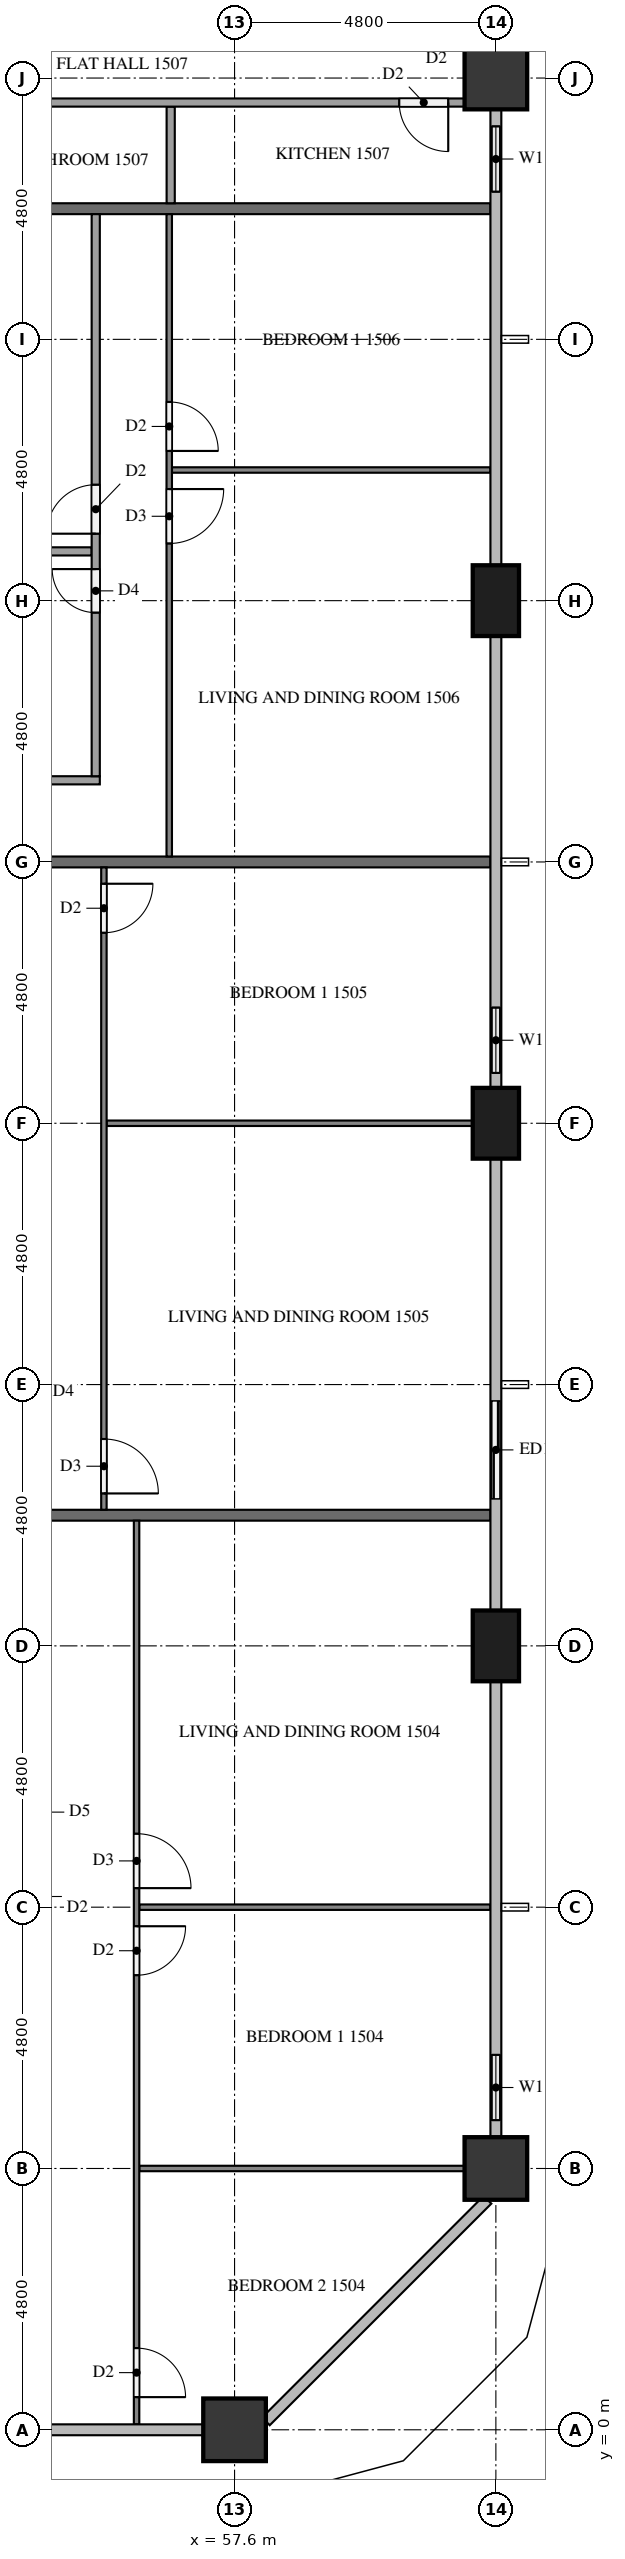
"""IFC4 building model, lengths in metres.
Left out: names, types, materials, properties, quantities, classifications, styles, units other than length and angle.
Written with IfcOpenShell. Run it as: python <this file> out.ifc"""

import sys

from ifc_helpers import new_model, si_unit, direction, frame, frame_2d, origin, origin_2d, place, context, subcontext, project, spatial, rectangle, extrude, element, fill, save


model = new_model("IFC4")
c1 = context("Model", 3, precision=1e-05, world=origin(), true_north=direction((0.0, 1.0)))
c2 = subcontext(c1, "Body", "Model", "MODEL_VIEW")
j1 = project(units=[si_unit("LENGTHUNIT", "METRE"), si_unit("PLANEANGLEUNIT", "RADIAN")], contexts=[c1])
p1 = place(None, origin())
s1 = spatial("IfcSite", under=j1, at=p1, CompositionType="ELEMENT")
p2 = place(p1, origin())
s2 = spatial("IfcBuilding", under=s1, at=p2, CompositionType="ELEMENT")
p3 = place(p2, frame((0.0, 0.0, 62.8)))
s3 = spatial("IfcBuildingStorey", under=s2, at=p3, CompositionType="ELEMENT", Elevation=62.8)
for number, where, z_axis, x_axis in (
    (1, (57.6, 0.0, 0.0), (0.0, 0.0, 1.0), (1.0, 0.0, 0.0)),
    (2, (62.4, 4.8, 0.0), (0.0, 0.0, 1.0), (1.0, 0.0, 0.0)),
):
    element("IfcColumn", number, at=place(p3, frame(where, z_axis=z_axis, x_axis=x_axis)), inside=s3, PredefinedType="COLUMN", context=c2, shape_type="SweptSolid", body=[
        extrude(rectangle(XDim=1.15, YDim=1.15, at=origin_2d()), origin(), (0.0, 0.0, 1.0), 3.2),
    ])
for number, where, z_axis, x_axis in (
    (3, (62.4, 14.4, 0.0), (0.0, 0.0, 1.0), (0.0, 1.0, 0.0)),
    (4, (62.4, 24.0, 0.0), (0.0, 0.0, 1.0), (0.0, 1.0, 0.0)),
    (5, (62.4, 33.6, 0.0), (0.0, 0.0, 1.0), (0.0, 1.0, 0.0)),
):
    element("IfcColumn", number, at=place(p3, frame(where, z_axis=z_axis, x_axis=x_axis)), inside=s3, PredefinedType="COLUMN", context=c2, shape_type="SweptSolid", body=[
        extrude(rectangle(XDim=1.3, YDim=0.85, at=origin_2d()), origin(), (0.0, 0.0, 1.0), 3.2),
    ])
p4 = place(p3, frame((62.4, 43.2, 0.0), z_axis=(0.0, 0.0, 1.0), x_axis=(1.0, 0.0, 0.0)))
e6 = element("IfcColumn", 6, at=p4, inside=s3, PredefinedType="COLUMN", context=c2, shape_type="SweptSolid", body=[
    extrude(rectangle(XDim=1.15, YDim=1.15, at=origin_2d()), origin(), (0.0, 0.0, 1.0), 3.2),
])
p5 = place(p3, frame((62.4, 5.375, 0.0), z_axis=(0.0, 0.0, 1.0), x_axis=(0.0, 1.0, 0.0)))
e7 = element("IfcWall", 7, at=p5, inside=s3, PredefinedType="SOLIDWALL", context=c2, shape_type="SweptSolid", body=[
    extrude(rectangle(XDim=1.825, YDim=0.15, at=frame_2d((0.913, 0.0))), origin(), (0.0, 0.0, 1.0), 3.2),
])
p6 = place(p5, frame((0.312, 0.0, 0.9)))
e8 = element("IfcOpeningElement", 8, at=p6, cuts=e7, PredefinedType="OPENING", context=c2, shape_type="SweptSolid", body=[
    extrude(rectangle(XDim=1.2, YDim=1.4, at=frame_2d((0.6, 0.7))), frame((0.0, 0.085, 0.0), z_axis=(0.0, -1.0, 0.0), x_axis=(1.0, 0.0, 0.0)), (0.0, 0.0, 1.0), 0.17),
])
p7 = place(p3, frame((62.4, 16.8, 0.0), z_axis=(0.0, 0.0, 1.0), x_axis=(0.0, 1.0, 0.0)))
e9 = element("IfcWall", 9, at=p7, inside=s3, PredefinedType="SOLIDWALL", context=c2, shape_type="SweptSolid", body=[
    extrude(rectangle(XDim=2.4, YDim=0.15, at=frame_2d((1.2, 0.0))), origin(), (0.0, 0.0, 1.0), 3.2),
])
p8 = place(p7, frame((0.3, 0.0, 0.0)))
e10 = element("IfcOpeningElement", 10, at=p8, cuts=e9, PredefinedType="OPENING", context=c2, shape_type="SweptSolid", body=[
    extrude(rectangle(XDim=1.8, YDim=2.4, at=frame_2d((0.9, 1.2))), frame((0.0, 0.085, 0.0), z_axis=(0.0, -1.0, 0.0), x_axis=(1.0, 0.0, 0.0)), (0.0, 0.0, 1.0), 0.17),
])
p9 = place(p3, frame((62.4, 24.65, 0.0), z_axis=(0.0, 0.0, 1.0), x_axis=(0.0, 1.0, 0.0)))
e11 = element("IfcWall", 11, at=p9, inside=s3, PredefinedType="SOLIDWALL", context=c2, shape_type="SweptSolid", body=[
    extrude(rectangle(XDim=1.75, YDim=0.15, at=frame_2d((0.875, 0.0))), origin(), (0.0, 0.0, 1.0), 3.2),
])
p10 = place(p9, frame((0.275, 0.0, 0.9)))
e12 = element("IfcOpeningElement", 12, at=p10, cuts=e11, PredefinedType="OPENING", context=c2, shape_type="SweptSolid", body=[
    extrude(rectangle(XDim=1.2, YDim=1.4, at=frame_2d((0.6, 0.7))), frame((0.0, 0.085, 0.0), z_axis=(0.0, -1.0, 0.0), x_axis=(1.0, 0.0, 0.0)), (0.0, 0.0, 1.0), 0.17),
])
p11 = place(p3, frame((62.4, 40.8, 0.0), z_axis=(0.0, 0.0, 1.0), x_axis=(0.0, 1.0, 0.0)))
e13 = element("IfcWall", 13, at=p11, inside=s3, PredefinedType="SOLIDWALL", context=c2, shape_type="SweptSolid", body=[
    extrude(rectangle(XDim=1.825, YDim=0.15, at=frame_2d((0.913, 0.0))), origin(), (0.0, 0.0, 1.0), 3.2),
])
p12 = place(p11, frame((0.312, 0.0, 0.9)))
e14 = element("IfcOpeningElement", 14, at=p12, cuts=e13, PredefinedType="OPENING", context=c2, shape_type="SweptSolid", body=[
    extrude(rectangle(XDim=1.2, YDim=1.4, at=frame_2d((0.6, 0.7))), frame((0.0, 0.085, 0.0), z_axis=(0.0, -1.0, 0.0), x_axis=(1.0, 0.0, 0.0)), (0.0, 0.0, 1.0), 0.17),
])
for number, where, z_axis, x_axis in (
    (15, (50.5, 16.8, 0.0), (0.0, 0.0, 1.0), (1.0, 0.0, 0.0)),
    (16, (50.5, 28.8, 0.0), (0.0, 0.0, 1.0), (1.0, 0.0, 0.0)),
    (17, (50.5, 40.8, 0.0), (0.0, 0.0, 1.0), (1.0, 0.0, 0.0)),
):
    element("IfcWall", number, at=place(p3, frame(where, z_axis=z_axis, x_axis=x_axis)), inside=s3, PredefinedType="PARTITIONING", context=c2, shape_type="SweptSolid", body=[
        extrude(rectangle(XDim=11.8, YDim=0.2, at=frame_2d((5.9, 0.0))), origin(), (0.0, 0.0, 1.0), 3.2),
    ])
p13 = place(p3, frame((55.85, 9.6, 0.0), z_axis=(0.0, 0.0, 1.0), x_axis=(1.0, 0.0, 0.0)))
e18 = element("IfcWall", 18, at=p13, inside=s3, PredefinedType="PARTITIONING", context=c2, shape_type="SweptSolid", body=[
    extrude(rectangle(XDim=6.45, YDim=0.1, at=frame_2d((3.225, 0.0))), origin(), (0.0, 0.0, 1.0), 3.2),
])
p14 = place(p3, frame((55.85, 4.8, 0.0), z_axis=(0.0, 0.0, 1.0), x_axis=(1.0, 0.0, 0.0)))
e19 = element("IfcWall", 19, at=p14, inside=s3, PredefinedType="PARTITIONING", context=c2, shape_type="SweptSolid", body=[
    extrude(rectangle(XDim=5.975, YDim=0.1, at=frame_2d((2.987, 0.0))), origin(), (0.0, 0.0, 1.0), 3.2),
])
p15 = place(p3, frame((55.8, 16.7, 0.0), z_axis=(0.0, 0.0, 1.0), x_axis=(0.0, -1.0, 0.0)))
e20 = element("IfcWall", 20, at=p15, inside=s3, PredefinedType="PARTITIONING", context=c2, shape_type="SweptSolid", body=[
    extrude(rectangle(XDim=16.6, YDim=0.1, at=frame_2d((8.3, 0.0))), origin(), (0.0, 0.0, 1.0), 3.2),
])
p16 = place(p15, frame((5.75, 0.0, 0.0)))
e21 = element("IfcOpeningElement", 21, at=p16, cuts=e20, PredefinedType="OPENING", context=c2, shape_type="SweptSolid", body=[
    extrude(rectangle(XDim=1.0, YDim=2.1, at=frame_2d((0.5, 1.05))), frame((0.0, 0.06, 0.0), z_axis=(0.0, -1.0, 0.0), x_axis=(1.0, 0.0, 0.0)), (0.0, 0.0, 1.0), 0.12),
])
p17 = place(p15, frame((7.45, 0.0, 0.0)))
e22 = element("IfcOpeningElement", 22, at=p17, cuts=e20, PredefinedType="OPENING", context=c2, shape_type="SweptSolid", body=[
    extrude(rectangle(XDim=0.9, YDim=2.1, at=frame_2d((0.45, 1.05))), frame((0.0, 0.06, 0.0), z_axis=(0.0, -1.0, 0.0), x_axis=(1.0, 0.0, 0.0)), (0.0, 0.0, 1.0), 0.12),
])
p18 = place(p15, frame((15.2, 0.0, 0.0)))
e23 = element("IfcOpeningElement", 23, at=p18, cuts=e20, PredefinedType="OPENING", context=c2, shape_type="SweptSolid", body=[
    extrude(rectangle(XDim=0.9, YDim=2.1, at=frame_2d((0.45, 1.05))), frame((0.0, 0.06, 0.0), z_axis=(0.0, -1.0, 0.0), x_axis=(1.0, 0.0, 0.0)), (0.0, 0.0, 1.0), 0.12),
])
p19 = place(p3, frame((55.25, 24.0, 0.0), z_axis=(0.0, 0.0, 1.0), x_axis=(1.0, 0.0, 0.0)))
e24 = element("IfcWall", 24, at=p19, inside=s3, PredefinedType="PARTITIONING", context=c2, shape_type="SweptSolid", body=[
    extrude(rectangle(XDim=6.725, YDim=0.1, at=frame_2d((3.363, 0.0))), origin(), (0.0, 0.0, 1.0), 3.2),
])
p20 = place(p3, frame((55.2, 28.7, 0.0), z_axis=(0.0, 0.0, 1.0), x_axis=(0.0, -1.0, 0.0)))
e25 = element("IfcWall", 25, at=p20, inside=s3, PredefinedType="PARTITIONING", context=c2, shape_type="SweptSolid", body=[
    extrude(rectangle(XDim=11.8, YDim=0.1, at=frame_2d((5.9, 0.0))), origin(), (0.0, 0.0, 1.0), 3.2),
])
p21 = place(p20, frame((10.5, 0.0, 0.0)))
e26 = element("IfcOpeningElement", 26, at=p21, cuts=e25, PredefinedType="OPENING", context=c2, shape_type="SweptSolid", body=[
    extrude(rectangle(XDim=1.0, YDim=2.1, at=frame_2d((0.5, 1.05))), frame((0.0, 0.06, 0.0), z_axis=(0.0, -1.0, 0.0), x_axis=(1.0, 0.0, 0.0)), (0.0, 0.0, 1.0), 0.12),
])
p22 = place(p20, frame((0.3, 0.0, 0.0)))
e27 = element("IfcOpeningElement", 27, at=p22, cuts=e25, PredefinedType="OPENING", context=c2, shape_type="SweptSolid", body=[
    extrude(rectangle(XDim=0.9, YDim=2.1, at=frame_2d((0.45, 1.05))), frame((0.0, 0.06, 0.0), z_axis=(0.0, -1.0, 0.0), x_axis=(1.0, 0.0, 0.0)), (0.0, 0.0, 1.0), 0.12),
])
p23 = place(p3, frame((56.45, 36.0, 0.0), z_axis=(0.0, 0.0, 1.0), x_axis=(1.0, 0.0, 0.0)))
e28 = element("IfcWall", 28, at=p23, inside=s3, PredefinedType="PARTITIONING", context=c2, shape_type="SweptSolid", body=[
    extrude(rectangle(XDim=5.85, YDim=0.1, at=frame_2d((2.925, 0.0))), origin(), (0.0, 0.0, 1.0), 3.2),
])
p24 = place(p3, frame((56.4, 40.7, 0.0), z_axis=(0.0, 0.0, 1.0), x_axis=(0.0, -1.0, 0.0)))
e29 = element("IfcWall", 29, at=p24, inside=s3, PredefinedType="PARTITIONING", context=c2, shape_type="SweptSolid", body=[
    extrude(rectangle(XDim=11.8, YDim=0.1, at=frame_2d((5.9, 0.0))), origin(), (0.0, 0.0, 1.0), 3.2),
])
p25 = place(p24, frame((5.05, 0.0, 0.0)))
e30 = element("IfcOpeningElement", 30, at=p25, cuts=e29, PredefinedType="OPENING", context=c2, shape_type="SweptSolid", body=[
    extrude(rectangle(XDim=1.0, YDim=2.1, at=frame_2d((0.5, 1.05))), frame((0.0, 0.06, 0.0), z_axis=(0.0, -1.0, 0.0), x_axis=(1.0, 0.0, 0.0)), (0.0, 0.0, 1.0), 0.12),
])
p26 = place(p24, frame((3.45, 0.0, 0.0)))
e31 = element("IfcOpeningElement", 31, at=p26, cuts=e29, PredefinedType="OPENING", context=c2, shape_type="SweptSolid", body=[
    extrude(rectangle(XDim=0.9, YDim=2.1, at=frame_2d((0.45, 1.05))), frame((0.0, 0.06, 0.0), z_axis=(0.0, -1.0, 0.0), x_axis=(1.0, 0.0, 0.0)), (0.0, 0.0, 1.0), 0.12),
])
p27 = place(p3, frame((50.5, 34.505, 0.0), z_axis=(0.0, 0.0, 1.0), x_axis=(1.0, 0.0, 0.0)))
e32 = element("IfcWall", 32, at=p27, inside=s3, PredefinedType="PARTITIONING", context=c2, shape_type="SweptSolid", body=[
    extrude(rectangle(XDim=4.475, YDim=0.15, at=frame_2d((2.238, 0.0))), origin(), (0.0, 0.0, 1.0), 3.2),
])
p28 = place(p3, frame((50.5, 30.3, 0.0), z_axis=(0.0, 0.0, 1.0), x_axis=(1.0, 0.0, 0.0)))
e33 = element("IfcWall", 33, at=p28, inside=s3, PredefinedType="PARTITIONING", context=c2, shape_type="SweptSolid", body=[
    extrude(rectangle(XDim=4.625, YDim=0.15, at=frame_2d((2.312, 0.0))), origin(), (0.0, 0.0, 1.0), 3.2),
])
p29 = place(p3, frame((55.05, 30.375, 0.0), z_axis=(0.0, 0.0, 1.0), x_axis=(0.0, 1.0, 0.0)))
e34 = element("IfcWall", 34, at=p29, inside=s3, PredefinedType="PARTITIONING", context=c2, shape_type="SweptSolid", body=[
    extrude(rectangle(XDim=10.325, YDim=0.15, at=frame_2d((5.163, 0.0))), origin(), (0.0, 0.0, 1.0), 3.2),
])
p30 = place(p29, frame((3.005, 0.0, 0.0)))
e35 = element("IfcOpeningElement", 35, at=p30, cuts=e34, PredefinedType="OPENING", context=c2, shape_type="SweptSolid", body=[
    extrude(rectangle(XDim=0.8, YDim=2.1, at=frame_2d((0.4, 1.05))), frame((0.0, 0.085, 0.0), z_axis=(0.0, -1.0, 0.0), x_axis=(1.0, 0.0, 0.0)), (0.0, 0.0, 1.0), 0.17),
])
p31 = place(p29, frame((4.455, 0.0, 0.0)))
e36 = element("IfcOpeningElement", 36, at=p31, cuts=e34, PredefinedType="OPENING", context=c2, shape_type="SweptSolid", body=[
    extrude(rectangle(XDim=0.9, YDim=2.1, at=frame_2d((0.45, 1.05))), frame((0.0, 0.085, 0.0), z_axis=(0.0, -1.0, 0.0), x_axis=(1.0, 0.0, 0.0)), (0.0, 0.0, 1.0), 0.17),
])
p32 = place(p3, frame((56.427, 40.9, 0.0), z_axis=(0.0, 0.0, 1.0), x_axis=(0.0, 1.0, 0.0)))
e37 = element("IfcWall", 37, at=p32, inside=s3, PredefinedType="PARTITIONING", context=c2, shape_type="SweptSolid", body=[
    extrude(rectangle(XDim=1.775, YDim=0.15, at=frame_2d((0.888, 0.0))), origin(), (0.0, 0.0, 1.0), 3.2),
])
p33 = place(p3, frame((61.825, 42.75, 0.0), z_axis=(0.0, 0.0, 1.0), x_axis=(-1.0, 0.0, 0.0)))
e38 = element("IfcWall", 38, at=p33, inside=s3, PredefinedType="PARTITIONING", context=c2, shape_type="SweptSolid", body=[
    extrude(rectangle(XDim=12.25, YDim=0.15, at=frame_2d((6.125, 0.0))), origin(), (0.0, 0.0, 1.0), 3.2),
])
p34 = place(p33, frame((9.638, 0.0, 0.0)))
e39 = element("IfcOpeningElement", 39, at=p34, cuts=e38, PredefinedType="OPENING", context=c2, shape_type="SweptSolid", body=[
    extrude(rectangle(XDim=0.8, YDim=2.1, at=frame_2d((0.4, 1.05))), frame((0.0, 0.085, 0.0), z_axis=(0.0, -1.0, 0.0), x_axis=(1.0, 0.0, 0.0)), (0.0, 0.0, 1.0), 0.17),
])
p35 = place(p33, frame((8.088, 0.0, 0.0)))
e40 = element("IfcOpeningElement", 40, at=p35, cuts=e38, PredefinedType="OPENING", context=c2, shape_type="SweptSolid", body=[
    extrude(rectangle(XDim=0.9, YDim=2.1, at=frame_2d((0.45, 1.05))), frame((0.0, 0.085, 0.0), z_axis=(0.0, -1.0, 0.0), x_axis=(1.0, 0.0, 0.0)), (0.0, 0.0, 1.0), 0.17),
])
p36 = place(p33, frame((0.3, 0.0, 0.0)))
e41 = element("IfcOpeningElement", 41, at=p36, cuts=e38, PredefinedType="OPENING", context=c2, shape_type="SweptSolid", body=[
    extrude(rectangle(XDim=0.9, YDim=2.1, at=frame_2d((0.45, 1.05))), frame((0.0, 0.085, 0.0), z_axis=(0.0, -1.0, 0.0), x_axis=(1.0, 0.0, 0.0)), (0.0, 0.0, 1.0), 0.17),
])
p37 = place(p6, origin())
e42 = element("IfcWindow", 42, at=p37, inside=s3, PartitioningType="SINGLE_PANEL", PredefinedType="WINDOW", context=c2, shape_type="SweptSolid", body=[
    extrude(rectangle(XDim=1.2, YDim=1.4, at=frame_2d((0.6, 0.7))), frame((0.0, 0.03, 0.0), z_axis=(0.0, -1.0, 0.0), x_axis=(1.0, 0.0, 0.0)), (0.0, 0.0, 1.0), 0.06),
])
fill(e8, e42)
p38 = place(p8, origin())
e43 = element("IfcDoor", 43, at=p38, inside=s3, OperationType="SLIDING_TO_LEFT", PredefinedType="DOOR", context=c2, shape_type="SweptSolid", body=[
    extrude(rectangle(XDim=1.8, YDim=2.4, at=frame_2d((0.9, 1.2))), frame((0.0, 0.025, 0.0), z_axis=(0.0, -1.0, 0.0), x_axis=(1.0, 0.0, 0.0)), (0.0, 0.0, 1.0), 0.05),
])
fill(e10, e43)
p39 = place(p10, origin())
e44 = element("IfcWindow", 44, at=p39, inside=s3, PartitioningType="SINGLE_PANEL", PredefinedType="WINDOW", context=c2, shape_type="SweptSolid", body=[
    extrude(rectangle(XDim=1.2, YDim=1.4, at=frame_2d((0.6, 0.7))), frame((0.0, 0.03, 0.0), z_axis=(0.0, -1.0, 0.0), x_axis=(1.0, 0.0, 0.0)), (0.0, 0.0, 1.0), 0.06),
])
fill(e12, e44)
p40 = place(p12, origin())
e45 = element("IfcWindow", 45, at=p40, inside=s3, PartitioningType="SINGLE_PANEL", PredefinedType="WINDOW", context=c2, shape_type="SweptSolid", body=[
    extrude(rectangle(XDim=1.2, YDim=1.4, at=frame_2d((0.6, 0.7))), frame((0.0, 0.03, 0.0), z_axis=(0.0, -1.0, 0.0), x_axis=(1.0, 0.0, 0.0)), (0.0, 0.0, 1.0), 0.06),
])
fill(e14, e45)
p41 = place(p16, origin())
e46 = element("IfcDoor", 46, at=p41, inside=s3, OperationType="SINGLE_SWING_RIGHT", PredefinedType="DOOR", context=c2, shape_type="SweptSolid", body=[
    extrude(rectangle(XDim=1.0, YDim=2.1, at=frame_2d((0.5, 1.05))), frame((0.0, 0.025, 0.0), z_axis=(0.0, -1.0, 0.0), x_axis=(1.0, 0.0, 0.0)), (0.0, 0.0, 1.0), 0.05),
])
fill(e21, e46)
p42 = place(p17, origin())
e47 = element("IfcDoor", 47, at=p42, inside=s3, OperationType="SINGLE_SWING_LEFT", PredefinedType="DOOR", context=c2, shape_type="SweptSolid", body=[
    extrude(rectangle(XDim=0.9, YDim=2.1, at=frame_2d((0.45, 1.05))), frame((0.0, 0.025, 0.0), z_axis=(0.0, -1.0, 0.0), x_axis=(1.0, 0.0, 0.0)), (0.0, 0.0, 1.0), 0.05),
])
fill(e22, e47)
p43 = place(p18, origin())
e48 = element("IfcDoor", 48, at=p43, inside=s3, OperationType="SINGLE_SWING_RIGHT", PredefinedType="DOOR", context=c2, shape_type="SweptSolid", body=[
    extrude(rectangle(XDim=0.9, YDim=2.1, at=frame_2d((0.45, 1.05))), frame((0.0, 0.025, 0.0), z_axis=(0.0, -1.0, 0.0), x_axis=(1.0, 0.0, 0.0)), (0.0, 0.0, 1.0), 0.05),
])
fill(e23, e48)
p44 = place(p21, origin())
e49 = element("IfcDoor", 49, at=p44, inside=s3, OperationType="SINGLE_SWING_RIGHT", PredefinedType="DOOR", context=c2, shape_type="SweptSolid", body=[
    extrude(rectangle(XDim=1.0, YDim=2.1, at=frame_2d((0.5, 1.05))), frame((0.0, 0.025, 0.0), z_axis=(0.0, -1.0, 0.0), x_axis=(1.0, 0.0, 0.0)), (0.0, 0.0, 1.0), 0.05),
])
fill(e26, e49)
p45 = place(p22, origin())
e50 = element("IfcDoor", 50, at=p45, inside=s3, OperationType="SINGLE_SWING_LEFT", PredefinedType="DOOR", context=c2, shape_type="SweptSolid", body=[
    extrude(rectangle(XDim=0.9, YDim=2.1, at=frame_2d((0.45, 1.05))), frame((0.0, 0.025, 0.0), z_axis=(0.0, -1.0, 0.0), x_axis=(1.0, 0.0, 0.0)), (0.0, 0.0, 1.0), 0.05),
])
fill(e27, e50)
p46 = place(p25, origin())
e51 = element("IfcDoor", 51, at=p46, inside=s3, OperationType="SINGLE_SWING_LEFT", PredefinedType="DOOR", context=c2, shape_type="SweptSolid", body=[
    extrude(rectangle(XDim=1.0, YDim=2.1, at=frame_2d((0.5, 1.05))), frame((0.0, 0.025, 0.0), z_axis=(0.0, -1.0, 0.0), x_axis=(1.0, 0.0, 0.0)), (0.0, 0.0, 1.0), 0.05),
])
fill(e30, e51)
p47 = place(p26, origin())
e52 = element("IfcDoor", 52, at=p47, inside=s3, OperationType="SINGLE_SWING_RIGHT", PredefinedType="DOOR", context=c2, shape_type="SweptSolid", body=[
    extrude(rectangle(XDim=0.9, YDim=2.1, at=frame_2d((0.45, 1.05))), frame((0.0, 0.025, 0.0), z_axis=(0.0, -1.0, 0.0), x_axis=(1.0, 0.0, 0.0)), (0.0, 0.0, 1.0), 0.05),
])
fill(e31, e52)
p48 = place(p30, origin())
e53 = element("IfcDoor", 53, at=p48, inside=s3, OperationType="SINGLE_SWING_RIGHT", PredefinedType="DOOR", context=c2, shape_type="SweptSolid", body=[
    extrude(rectangle(XDim=0.8, YDim=2.1, at=frame_2d((0.4, 1.05))), frame((0.0, 0.025, 0.0), z_axis=(0.0, -1.0, 0.0), x_axis=(1.0, 0.0, 0.0)), (0.0, 0.0, 1.0), 0.05),
])
fill(e35, e53)
p49 = place(p31, origin())
e54 = element("IfcDoor", 54, at=p49, inside=s3, OperationType="SINGLE_SWING_LEFT", PredefinedType="DOOR", context=c2, shape_type="SweptSolid", body=[
    extrude(rectangle(XDim=0.9, YDim=2.1, at=frame_2d((0.45, 1.05))), frame((0.0, 0.025, 0.0), z_axis=(0.0, -1.0, 0.0), x_axis=(1.0, 0.0, 0.0)), (0.0, 0.0, 1.0), 0.05),
])
fill(e36, e54)
p50 = place(p36, origin())
e55 = element("IfcDoor", 55, at=p50, inside=s3, OperationType="SINGLE_SWING_LEFT", PredefinedType="DOOR", context=c2, shape_type="SweptSolid", body=[
    extrude(rectangle(XDim=0.9, YDim=2.1, at=frame_2d((0.45, 1.05))), frame((0.0, 0.025, 0.0), z_axis=(0.0, -1.0, 0.0), x_axis=(1.0, 0.0, 0.0)), (0.0, 0.0, 1.0), 0.05),
])
fill(e41, e55)
save(model, sys.argv[1])
